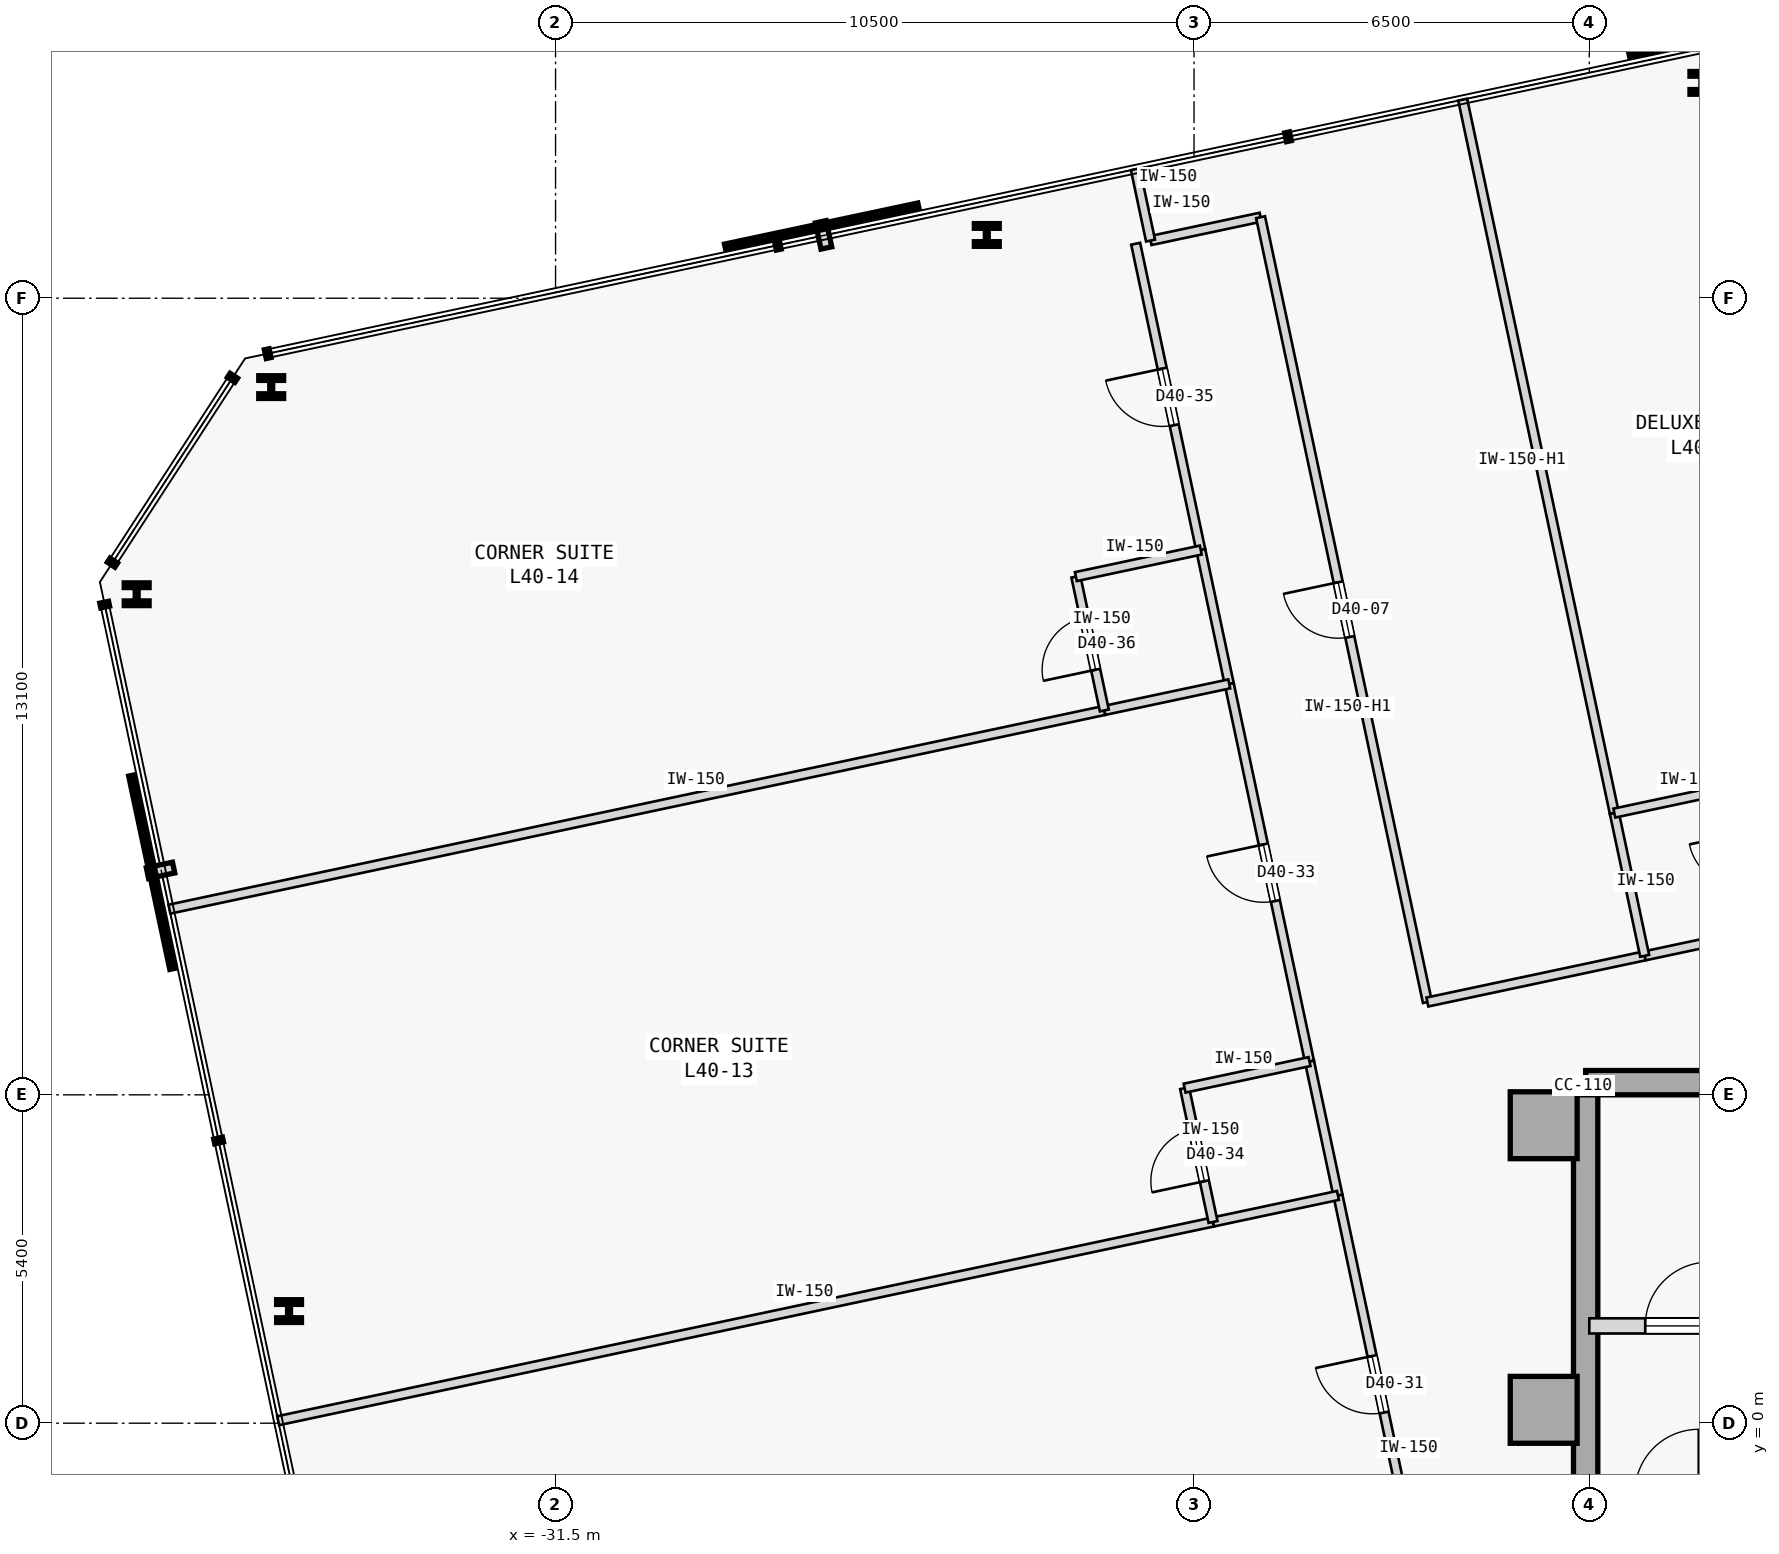
"""IFC4 building model, lengths in metres.
Left out: names, types, materials, properties, quantities, classifications, styles, units other than length and angle.
Written with IfcOpenShell. Run it as: python <this file> out.ifc"""

import sys

from ifc_helpers import new_model, si_unit, direction, frame, frame_2d, origin, origin_2d, place, context, subcontext, project, spatial, rectangle, i_section, extrude, element, fill, save


model = new_model("IFC4")
c1 = context("Model", 3, precision=1e-05, world=origin(), true_north=direction((0.0, 1.0)))
c2 = subcontext(c1, "Body", "Model", "MODEL_VIEW")
j1 = project(units=[si_unit("LENGTHUNIT", "METRE"), si_unit("PLANEANGLEUNIT", "RADIAN")], contexts=[c1])
p1 = place(None, origin())
s1 = spatial("IfcSite", under=j1, at=p1, CompositionType="ELEMENT")
p2 = place(p1, origin())
s2 = spatial("IfcBuilding", under=s1, at=p2, CompositionType="ELEMENT")
p3 = place(p2, frame((0.0, 0.0, 158.2)))
s3 = spatial("IfcBuildingStorey", under=s2, at=p3, CompositionType="ELEMENT", Elevation=158.2)
for number, where, z_axis, x_axis in (
    (1, (-15.25, 4.9, 0.0), (0.0, 0.0, 1.0), (1.0, 0.0, 0.0)),
    (2, (-15.25, 0.22, 0.0), (0.0, 0.0, 1.0), (1.0, 0.0, 0.0)),
):
    element("IfcColumn", number, at=place(p3, frame(where, z_axis=z_axis, x_axis=x_axis)), inside=s3, PredefinedType="COLUMN", context=c2, shape_type="SweptSolid", body=[
        extrude(rectangle(XDim=1.1, YDim=1.1, at=origin_2d()), origin(), (0.0, 0.0, 1.0), 3.4),
    ])
p4 = place(p3, frame((-14.56, 5.6, 0.0), z_axis=(0.0, 0.0, 1.0), x_axis=(1.0, 0.0, 0.0)))
e3 = element("IfcWall", 3, at=p4, inside=s3, PredefinedType="SHEAR", context=c2, shape_type="SweptSolid", body=[
    extrude(rectangle(XDim=11.41, YDim=0.4, at=frame_2d((5.705, 0.0))), origin(), (0.0, 0.0, 1.0), 3.175),
])
p5 = place(p3, frame((-14.56, -5.4, 0.0), z_axis=(0.0, 0.0, 1.0), x_axis=(0.0, 1.0, 0.0)))
e4 = element("IfcWall", 4, at=p5, inside=s3, PredefinedType="SHEAR", context=c2, shape_type="SweptSolid", body=[
    extrude(rectangle(XDim=10.8, YDim=0.4, at=frame_2d((5.4, 0.0))), origin(), (0.0, 0.0, 1.0), 3.175),
])
for number, where, z_axis, x_axis in (
    (5, (-12.64, 22.042, 0.0), (0.0, 0.0, 1.0), (1.0, 0.0, 0.0)),
    (6, (-24.408, 19.54, 0.0), (0.0, 0.0, 1.0), (1.0, 0.0, 0.0)),
    (7, (-36.176, 17.039, 0.0), (0.0, 0.0, 1.0), (1.0, 0.0, 0.0)),
    (8, (-38.389, 13.632, 0.0), (0.0, 0.0, 1.0), (1.0, 0.0, 0.0)),
    (9, (-35.883, 1.844, 0.0), (0.0, 0.0, 1.0), (1.0, 0.0, 0.0)),
):
    element("IfcColumn", number, at=place(p3, frame(where, z_axis=z_axis, x_axis=x_axis)), inside=s3, PredefinedType="COLUMN", context=c2, shape_type="SweptSolid", body=[
        extrude(i_section(OverallWidth=0.409, OverallDepth=0.374, WebThickness=0.048, FlangeThickness=0.077, FilletRadius=0.015, at=origin_2d()), origin(), (0.0, 0.0, 1.0), 3.4),
    ])
p6 = place(p3, frame((-14.5, 1.6, 0.0), z_axis=(0.0, 0.0, 1.0), x_axis=(1.0, 0.0, 0.0)))
e10 = element("IfcWall", 10, at=p6, inside=s3, PredefinedType="STANDARD", context=c2, shape_type="SweptSolid", body=[
    extrude(rectangle(XDim=3.6, YDim=0.25, at=frame_2d((1.8, 0.0))), origin(), (0.0, 0.0, 1.0), 3.175),
])
p7 = place(p6, frame((0.92, 0.0, 0.0)))
e11 = element("IfcOpeningElement", 11, at=p7, cuts=e10, PredefinedType="OPENING", context=c2, shape_type="SweptSolid", body=[
    extrude(rectangle(XDim=1.05, YDim=2.15, at=frame_2d((0.525, 1.075))), frame((0.0, 0.135, 0.0), z_axis=(0.0, -1.0, 0.0), x_axis=(1.0, 0.0, 0.0)), (0.0, 0.0, 1.0), 0.27),
])
p8 = place(p3, frame((-21.715, 19.448, 0.0), z_axis=(0.0, 0.0, 1.0), x_axis=(0.978160192495, 0.207852442415, 0.0)))
e12 = element("IfcWall", 12, at=p8, inside=s3, PredefinedType="PARTITIONING", context=c2, shape_type="SweptSolid", body=[
    extrude(rectangle(XDim=1.85, YDim=0.15, at=frame_2d((0.925, 0.0))), origin(), (0.0, 0.0, 1.0), 3.175),
])
p9 = place(p3, frame((-17.162, 6.926, 0.0), z_axis=(0.0, 0.0, 1.0), x_axis=(-0.207911421929, 0.978147657888, 0.0)))
e13 = element("IfcWall", 13, at=p9, inside=s3, PredefinedType="PARTITIONING", context=c2, shape_type="SweptSolid", body=[
    extrude(rectangle(XDim=13.195, YDim=0.15, at=frame_2d((6.598, 0.0))), origin(), (0.0, 0.0, 1.0), 2.725),
])
p10 = place(p9, frame((6.137, 0.0, 0.0)))
e14 = element("IfcOpeningElement", 14, at=p10, cuts=e13, PredefinedType="OPENING", context=c2, shape_type="SweptSolid", body=[
    extrude(rectangle(XDim=0.92, YDim=2.15, at=frame_2d((0.46, 1.075))), frame((0.0, 0.085, 0.0), z_axis=(0.0, -1.0, 0.0), x_axis=(1.0, 0.0, 0.0)), (0.0, 0.0, 1.0), 0.17),
])
p11 = place(p3, frame((-17.162, 6.926, 0.0), z_axis=(0.0, 0.0, 1.0), x_axis=(0.978147299501, 0.207913108004, 0.0)))
e15 = element("IfcWall", 15, at=p11, inside=s3, PredefinedType="PARTITIONING", context=c2, shape_type="SweptSolid", body=[
    extrude(rectangle(XDim=3.653, YDim=0.15, at=frame_2d((1.827, 0.0))), origin(), (0.0, 0.0, 1.0), 3.175),
])
p12 = place(p3, frame((-13.589, 7.685, 0.0), z_axis=(0.0, 0.0, 1.0), x_axis=(0.97811873796, 0.208047433175, 0.0)))
e16 = element("IfcWall", 16, at=p12, inside=s3, PredefinedType="PARTITIONING", context=c2, shape_type="SweptSolid", body=[
    extrude(rectangle(XDim=1.981, YDim=0.15, at=frame_2d((0.99, 0.0))), origin(), (0.0, 0.0, 1.0), 3.175),
])
p13 = place(p3, frame((-17.313, -2.466, 0.0), z_axis=(0.0, 0.0, 1.0), x_axis=(-0.207916691923, 0.978146537703, 0.0)))
e17 = element("IfcWall", 17, at=p13, inside=s3, PredefinedType="PARTITIONING", context=c2, shape_type="SweptSolid", body=[
    extrude(rectangle(XDim=6.35, YDim=0.15, at=frame_2d((3.175, 0.0))), origin(), (0.0, 0.0, 1.0), 3.175),
])
p14 = place(p13, frame((2.7, 0.0, 0.0)))
e18 = element("IfcOpeningElement", 18, at=p14, cuts=e17, PredefinedType="OPENING", context=c2, shape_type="SweptSolid", body=[
    extrude(rectangle(XDim=0.95, YDim=2.15, at=frame_2d((0.475, 1.075))), frame((0.0, 0.085, 0.0), z_axis=(0.0, -1.0, 0.0), x_axis=(1.0, 0.0, 0.0)), (0.0, 0.0, 1.0), 0.17),
])
p15 = place(p3, frame((-19.101, 5.946, 0.0), z_axis=(0.0, 0.0, 1.0), x_axis=(-0.207916691923, 0.978146537703, 0.0)))
e19 = element("IfcWall", 19, at=p15, inside=s3, PredefinedType="PARTITIONING", context=c2, shape_type="SweptSolid", body=[
    extrude(rectangle(XDim=6.35, YDim=0.15, at=frame_2d((3.175, 0.0))), origin(), (0.0, 0.0, 1.0), 3.175),
])
p16 = place(p15, frame((2.7, 0.0, 0.0)))
e20 = element("IfcOpeningElement", 20, at=p16, cuts=e19, PredefinedType="OPENING", context=c2, shape_type="SweptSolid", body=[
    extrude(rectangle(XDim=0.95, YDim=2.15, at=frame_2d((0.475, 1.075))), frame((0.0, 0.085, 0.0), z_axis=(0.0, -1.0, 0.0), x_axis=(1.0, 0.0, 0.0)), (0.0, 0.0, 1.0), 0.17),
])
p17 = place(p3, frame((-18.633, 3.746, 0.0), z_axis=(0.0, 0.0, 1.0), x_axis=(-0.207913264065, 0.978147266328, 0.0)))
e21 = element("IfcWall", 21, at=p17, inside=s3, PredefinedType="PARTITIONING", context=c2, shape_type="SweptSolid", body=[
    extrude(rectangle(XDim=2.25, YDim=0.15, at=frame_2d((1.125, 0.0))), origin(), (0.0, 0.0, 1.0), 3.175),
])
p18 = place(p3, frame((-20.889, 14.358, 0.0), z_axis=(0.0, 0.0, 1.0), x_axis=(-0.207916584961, 0.978146560439, 0.0)))
e22 = element("IfcWall", 22, at=p18, inside=s3, PredefinedType="PARTITIONING", context=c2, shape_type="SweptSolid", body=[
    extrude(rectangle(XDim=5.15, YDim=0.15, at=frame_2d((2.575, 0.0))), origin(), (0.0, 0.0, 1.0), 3.175),
])
p19 = place(p18, frame((2.1, 0.0, 0.0)))
e23 = element("IfcOpeningElement", 23, at=p19, cuts=e22, PredefinedType="OPENING", context=c2, shape_type="SweptSolid", body=[
    extrude(rectangle(XDim=0.95, YDim=2.15, at=frame_2d((0.475, 1.075))), frame((0.0, 0.085, 0.0), z_axis=(0.0, -1.0, 0.0), x_axis=(1.0, 0.0, 0.0)), (0.0, 0.0, 1.0), 0.17),
])
p20 = place(p3, frame((-20.421, 12.158, 0.0), z_axis=(0.0, 0.0, 1.0), x_axis=(-0.207913264065, 0.978147266328, 0.0)))
e24 = element("IfcWall", 24, at=p20, inside=s3, PredefinedType="PARTITIONING", context=c2, shape_type="SweptSolid", body=[
    extrude(rectangle(XDim=2.25, YDim=0.15, at=frame_2d((1.125, 0.0))), origin(), (0.0, 0.0, 1.0), 3.175),
])
p21 = place(p3, frame((-14.088, 10.033, 0.0), z_axis=(0.0, 0.0, 1.0), x_axis=(-0.207910848762, 0.978147779718, 0.0)))
e25 = element("IfcWall", 25, at=p21, inside=s3, PredefinedType="PARTITIONING", context=c2, shape_type="SweptSolid", body=[
    extrude(rectangle(XDim=11.995, YDim=0.15, at=frame_2d((5.998, 0.0))), origin(), (0.0, 0.0, 1.0), 2.725),
])
p22 = place(p3, frame((-13.589, 7.685, 0.0), z_axis=(0.0, 0.0, 1.0), x_axis=(-0.207917150959, 0.978146440129, 0.0)))
e26 = element("IfcWall", 26, at=p22, inside=s3, PredefinedType="PARTITIONING", context=c2, shape_type="SweptSolid", body=[
    extrude(rectangle(XDim=2.4, YDim=0.15, at=frame_2d((1.2, 0.0))), origin(), (0.0, 0.0, 1.0), 3.175),
])
p23 = place(p3, frame((-21.715, 19.448, 0.0), z_axis=(0.0, 0.0, 1.0), x_axis=(-0.20795853359, 0.978137642823, 0.0)))
e27 = element("IfcWall", 27, at=p23, inside=s3, PredefinedType="PARTITIONING", context=c2, shape_type="SweptSolid", body=[
    extrude(rectangle(XDim=1.2, YDim=0.15, at=frame_2d((0.6, 0.0))), origin(), (0.0, 0.0, 1.0), 3.175),
])
p24 = place(p3, frame((-14.088, 10.033, 0.0), z_axis=(0.0, 0.0, 1.0), x_axis=(0.978149140323, 0.20790444749, 0.0)))
e28 = element("IfcWall", 28, at=p24, inside=s3, PredefinedType="PARTITIONING", context=c2, shape_type="SweptSolid", body=[
    extrude(rectangle(XDim=1.981, YDim=0.15, at=frame_2d((0.99, 0.0))), origin(), (0.0, 0.0, 1.0), 3.175),
])
p25 = place(p3, frame((-36.062, 0.041, 0.0), z_axis=(0.0, 0.0, 1.0), x_axis=(0.978149296727, 0.207903711638, 0.0)))
e29 = element("IfcWall", 29, at=p25, inside=s3, PredefinedType="PARTITIONING", context=c2, shape_type="SweptSolid", body=[
    extrude(rectangle(XDim=15.718, YDim=0.15, at=frame_2d((7.859, 0.0))), origin(), (0.0, 0.0, 1.0), 3.175),
])
p26 = place(p3, frame((-20.688, 3.309, 0.0), z_axis=(0.0, 0.0, 1.0), x_axis=(0.978134617382, 0.207972763311, 0.0)))
e30 = element("IfcWall", 30, at=p26, inside=s3, PredefinedType="PARTITIONING", context=c2, shape_type="SweptSolid", body=[
    extrude(rectangle(XDim=2.1, YDim=0.15, at=frame_2d((1.05, 0.0))), origin(), (0.0, 0.0, 1.0), 3.175),
])
p27 = place(p3, frame((-20.688, 3.309, 0.0), z_axis=(0.0, 0.0, 1.0), x_axis=(-0.207891197838, 0.978151956427, 0.0)))
e31 = element("IfcWall", 31, at=p27, inside=s3, PredefinedType="PARTITIONING", context=c2, shape_type="SweptSolid", body=[
    extrude(rectangle(XDim=2.25, YDim=0.15, at=frame_2d((1.125, 0.0))), origin(), (0.0, 0.0, 1.0), 3.175),
])
p28 = place(p27, frame((0.685, 0.0, 0.0)))
e32 = element("IfcOpeningElement", 32, at=p28, cuts=e31, PredefinedType="OPENING", context=c2, shape_type="SweptSolid", body=[
    extrude(rectangle(XDim=0.88, YDim=2.15, at=frame_2d((0.44, 1.075))), frame((0.0, 0.085, 0.0), z_axis=(0.0, -1.0, 0.0), x_axis=(1.0, 0.0, 0.0)), (0.0, 0.0, 1.0), 0.17),
])
p29 = place(p3, frame((-21.155, 5.51, 0.0), z_axis=(0.0, 0.0, 1.0), x_axis=(0.97815826, 0.207861536591, 0.0)))
e33 = element("IfcWall", 33, at=p29, inside=s3, PredefinedType="PARTITIONING", context=c2, shape_type="SweptSolid", body=[
    extrude(rectangle(XDim=2.1, YDim=0.15, at=frame_2d((1.05, 0.0))), origin(), (0.0, 0.0, 1.0), 3.175),
])
p30 = place(p3, frame((-37.85, 8.453, 0.0), z_axis=(0.0, 0.0, 1.0), x_axis=(0.978149296727, 0.207903711638, 0.0)))
e34 = element("IfcWall", 34, at=p30, inside=s3, PredefinedType="PARTITIONING", context=c2, shape_type="SweptSolid", body=[
    extrude(rectangle(XDim=15.718, YDim=0.15, at=frame_2d((7.859, 0.0))), origin(), (0.0, 0.0, 1.0), 3.175),
])
p31 = place(p3, frame((-22.476, 11.721, 0.0), z_axis=(0.0, 0.0, 1.0), x_axis=(0.978134617382, 0.207972763311, 0.0)))
e35 = element("IfcWall", 35, at=p31, inside=s3, PredefinedType="PARTITIONING", context=c2, shape_type="SweptSolid", body=[
    extrude(rectangle(XDim=2.1, YDim=0.15, at=frame_2d((1.05, 0.0))), origin(), (0.0, 0.0, 1.0), 3.175),
])
p32 = place(p3, frame((-22.476, 11.721, 0.0), z_axis=(0.0, 0.0, 1.0), x_axis=(-0.207891197838, 0.978151956427, 0.0)))
e36 = element("IfcWall", 36, at=p32, inside=s3, PredefinedType="PARTITIONING", context=c2, shape_type="SweptSolid", body=[
    extrude(rectangle(XDim=2.25, YDim=0.15, at=frame_2d((1.125, 0.0))), origin(), (0.0, 0.0, 1.0), 3.175),
])
p33 = place(p32, frame((0.685, 0.0, 0.0)))
e37 = element("IfcOpeningElement", 37, at=p33, cuts=e36, PredefinedType="OPENING", context=c2, shape_type="SweptSolid", body=[
    extrude(rectangle(XDim=0.88, YDim=2.15, at=frame_2d((0.44, 1.075))), frame((0.0, 0.085, 0.0), z_axis=(0.0, -1.0, 0.0), x_axis=(1.0, 0.0, 0.0)), (0.0, 0.0, 1.0), 0.17),
])
p34 = place(p3, frame((-22.943, 13.922, 0.0), z_axis=(0.0, 0.0, 1.0), x_axis=(0.97815826, 0.207861536591, 0.0)))
e38 = element("IfcWall", 38, at=p34, inside=s3, PredefinedType="PARTITIONING", context=c2, shape_type="SweptSolid", body=[
    extrude(rectangle(XDim=2.1, YDim=0.15, at=frame_2d((1.05, 0.0))), origin(), (0.0, 0.0, 1.0), 3.175),
])
p35 = place(p7, origin())
e39 = element("IfcDoor", 39, at=p35, inside=s3, OperationType="SINGLE_SWING_RIGHT", PredefinedType="DOOR", context=c2, shape_type="SweptSolid", body=[
    extrude(rectangle(XDim=1.05, YDim=2.15, at=frame_2d((0.525, 1.075))), frame((0.0, 0.025, 0.0), z_axis=(0.0, -1.0, 0.0), x_axis=(1.0, 0.0, 0.0)), (0.0, 0.0, 1.0), 0.05),
])
fill(e11, e39)
p36 = place(p10, origin())
e40 = element("IfcDoor", 40, at=p36, inside=s3, OperationType="SINGLE_SWING_RIGHT", PredefinedType="DOOR", context=c2, shape_type="SweptSolid", body=[
    extrude(rectangle(XDim=0.92, YDim=2.15, at=frame_2d((0.46, 1.075))), frame((0.0, 0.025, 0.0), z_axis=(0.0, -1.0, 0.0), x_axis=(1.0, 0.0, 0.0)), (0.0, 0.0, 1.0), 0.05),
])
fill(e14, e40)
p37 = place(p14, origin())
e41 = element("IfcDoor", 41, at=p37, inside=s3, OperationType="SINGLE_SWING_RIGHT", PredefinedType="DOOR", context=c2, shape_type="SweptSolid", body=[
    extrude(rectangle(XDim=0.95, YDim=2.15, at=frame_2d((0.475, 1.075))), frame((0.0, 0.025, 0.0), z_axis=(0.0, -1.0, 0.0), x_axis=(1.0, 0.0, 0.0)), (0.0, 0.0, 1.0), 0.05),
])
fill(e18, e41)
p38 = place(p16, origin())
e42 = element("IfcDoor", 42, at=p38, inside=s3, OperationType="SINGLE_SWING_RIGHT", PredefinedType="DOOR", context=c2, shape_type="SweptSolid", body=[
    extrude(rectangle(XDim=0.95, YDim=2.15, at=frame_2d((0.475, 1.075))), frame((0.0, 0.025, 0.0), z_axis=(0.0, -1.0, 0.0), x_axis=(1.0, 0.0, 0.0)), (0.0, 0.0, 1.0), 0.05),
])
fill(e20, e42)
p39 = place(p28, origin())
e43 = element("IfcDoor", 43, at=p39, inside=s3, OperationType="SINGLE_SWING_LEFT", PredefinedType="DOOR", context=c2, shape_type="SweptSolid", body=[
    extrude(rectangle(XDim=0.88, YDim=2.15, at=frame_2d((0.44, 1.075))), frame((0.0, 0.025, 0.0), z_axis=(0.0, -1.0, 0.0), x_axis=(1.0, 0.0, 0.0)), (0.0, 0.0, 1.0), 0.05),
])
fill(e32, e43)
p40 = place(p19, origin())
e44 = element("IfcDoor", 44, at=p40, inside=s3, OperationType="SINGLE_SWING_RIGHT", PredefinedType="DOOR", context=c2, shape_type="SweptSolid", body=[
    extrude(rectangle(XDim=0.95, YDim=2.15, at=frame_2d((0.475, 1.075))), frame((0.0, 0.025, 0.0), z_axis=(0.0, -1.0, 0.0), x_axis=(1.0, 0.0, 0.0)), (0.0, 0.0, 1.0), 0.05),
])
fill(e23, e44)
p41 = place(p33, origin())
e45 = element("IfcDoor", 45, at=p41, inside=s3, OperationType="SINGLE_SWING_LEFT", PredefinedType="DOOR", context=c2, shape_type="SweptSolid", body=[
    extrude(rectangle(XDim=0.88, YDim=2.15, at=frame_2d((0.44, 1.075))), frame((0.0, 0.025, 0.0), z_axis=(0.0, -1.0, 0.0), x_axis=(1.0, 0.0, 0.0)), (0.0, 0.0, 1.0), 0.05),
])
fill(e37, e45)
save(model, sys.argv[1])
